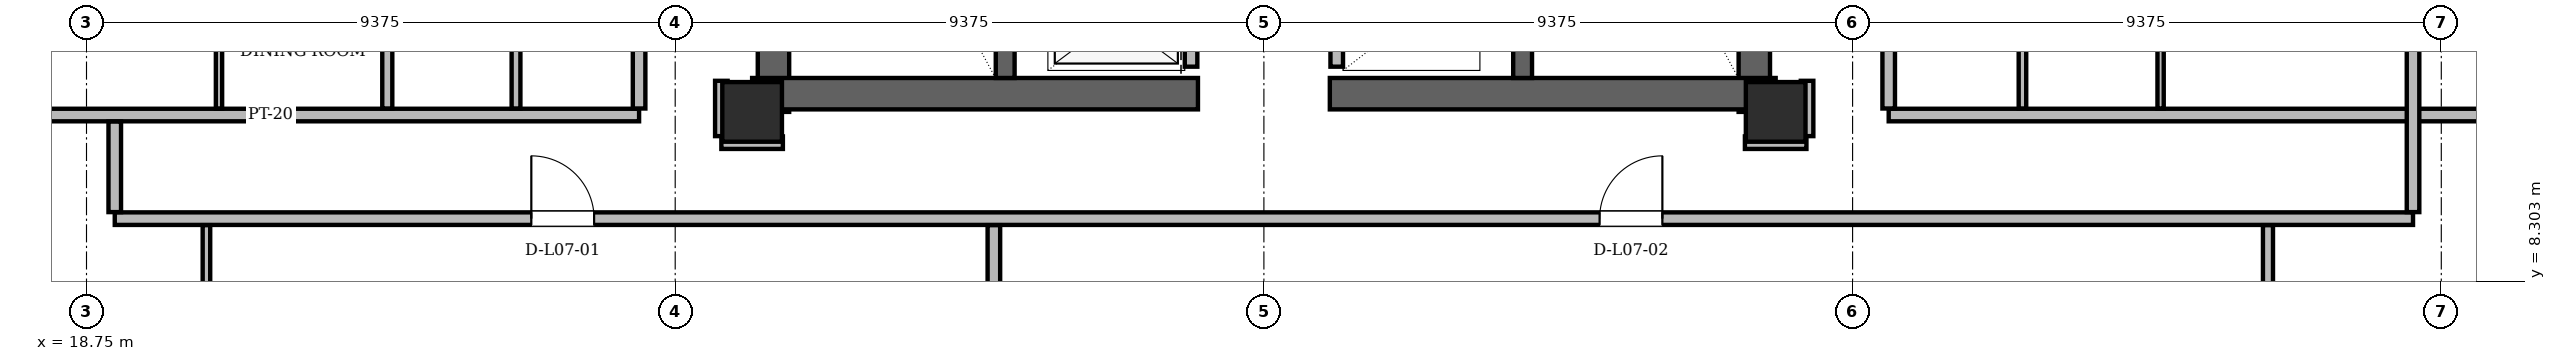
"""IFC4 building model, lengths in metres.
Left out: names, types, materials, properties, quantities, classifications, styles, units other than length and angle.
Written with IfcOpenShell. Run it as: python <this file> out.ifc"""

import sys

from ifc_helpers import new_model, si_unit, direction, frame, frame_2d, origin, origin_2d, place, context, subcontext, project, spatial, rectangle, hollow_rectangle, extrude, element, fill, save


model = new_model("IFC4")
c1 = context("Model", 3, precision=1e-05, world=origin(), true_north=direction((0.0, 1.0)))
c2 = subcontext(c1, "Body", "Model", "MODEL_VIEW")
j1 = project(units=[si_unit("LENGTHUNIT", "METRE"), si_unit("PLANEANGLEUNIT", "RADIAN")], contexts=[c1])
p1 = place(None, origin())
s1 = spatial("IfcSite", under=j1, at=p1, CompositionType="ELEMENT")
p2 = place(p1, origin())
s2 = spatial("IfcBuilding", under=s1, at=p2, CompositionType="ELEMENT")
p3 = place(p2, frame((0.0, 0.0, 30.9)))
s3 = spatial("IfcBuildingStorey", under=s2, at=p3, CompositionType="ELEMENT", Elevation=30.9)
for number, where, z_axis, x_axis in (
    (1, (29.35, 11.0, 0.0), (0.0, 0.0, 1.0), (1.0, 0.0, 0.0)),
    (2, (45.65, 11.0, 0.0), (0.0, 0.0, 1.0), (1.0, 0.0, 0.0)),
):
    element("IfcColumn", number, at=place(p3, frame(where, z_axis=z_axis, x_axis=x_axis)), inside=s3, PredefinedType="COLUMN", context=c2, shape_type="SweptSolid", body=[
        extrude(hollow_rectangle(XDim=0.95, YDim=0.95, WallThickness=0.08, at=origin_2d()), origin(), (0.0, 0.0, 1.0), 3.6),
    ])
for number, where, z_axis, x_axis in (
    (3, (29.69, 11.0, 0.0), (0.0, 0.0, 1.0), (0.0, 1.0, 0.0)),
    (4, (45.31, 11.0, 0.0), (0.0, 0.0, 1.0), (0.0, 1.0, 0.0)),
):
    element("IfcWall", number, at=place(p3, frame(where, z_axis=z_axis, x_axis=x_axis)), inside=s3, PredefinedType="SHEAR", context=c2, shape_type="SweptSolid", body=[
        extrude(rectangle(XDim=13.3, YDim=0.5, at=frame_2d((6.65, 0.0))), origin(), (0.0, 0.0, 1.0), 3.36),
    ])
for number, where, z_axis, x_axis in (
    (5, (29.35, 11.29, 0.0), (0.0, 0.0, 1.0), (1.0, 0.0, 0.0)),
    (6, (38.55, 11.29, 0.0), (0.0, 0.0, 1.0), (1.0, 0.0, 0.0)),
):
    element("IfcWall", number, at=place(p3, frame(where, z_axis=z_axis, x_axis=x_axis)), inside=s3, PredefinedType="SHEAR", context=c2, shape_type="SweptSolid", body=[
        extrude(rectangle(XDim=7.1, YDim=0.5, at=frame_2d((3.55, 0.0))), origin(), (0.0, 0.0, 1.0), 3.36),
    ])
for number, where, z_axis, x_axis in (
    (7, (33.38, 11.54, 0.0), (0.0, 0.0, 1.0), (0.0, 1.0, 0.0)),
    (8, (41.62, 11.54, 0.0), (0.0, 0.0, 1.0), (0.0, 1.0, 0.0)),
):
    element("IfcWall", number, at=place(p3, frame(where, z_axis=z_axis, x_axis=x_axis)), inside=s3, PredefinedType="SHEAR", context=c2, shape_type="SweptSolid", body=[
        extrude(rectangle(XDim=7.62, YDim=0.3, at=frame_2d((3.81, 0.0))), origin(), (0.0, 0.0, 1.0), 3.36),
    ])
p4 = place(p3, frame((13.156, 15.204, 0.0), z_axis=(0.0, 0.0, 1.0), x_axis=(0.500005775488, -0.866022069279, 0.0)))
e9 = element("IfcWall", 9, at=p4, inside=s3, PredefinedType="SOLIDWALL", context=c2, shape_type="SweptSolid", body=[
    extrude(rectangle(XDim=15.863, YDim=0.34, at=frame_2d((7.932, 0.0))), origin(), (0.0, 0.0, 1.0), 2.494),
])
p5 = place(p4, frame((2.909, 0.0, 0.85)))
e10 = element("IfcOpeningElement", 10, at=p5, cuts=e9, PredefinedType="OPENING", context=c2, shape_type="SweptSolid", body=[
    extrude(rectangle(XDim=1.2, YDim=1.48, at=frame_2d((0.6, 0.74))), frame((0.0, 0.17, 0.0), z_axis=(0.0, -1.0, 0.0), x_axis=(1.0, 0.0, 0.0)), (0.0, 0.0, 1.0), 0.34),
])
p6 = place(p3, frame((53.912, 1.466, 0.0), z_axis=(0.0, 0.0, 1.0), x_axis=(0.500005775488, 0.866022069279, 0.0)))
e11 = element("IfcWall", 11, at=p6, inside=s3, PredefinedType="SOLIDWALL", context=c2, shape_type="SweptSolid", body=[
    extrude(rectangle(XDim=15.863, YDim=0.34, at=frame_2d((7.932, 0.0))), origin(), (0.0, 0.0, 1.0), 2.494),
])
p7 = place(p6, frame((11.276, 0.0, 0.85)))
e12 = element("IfcOpeningElement", 12, at=p7, cuts=e11, PredefinedType="OPENING", context=c2, shape_type="SweptSolid", body=[
    extrude(rectangle(XDim=1.2, YDim=1.48, at=frame_2d((0.6, 0.74))), frame((0.0, 0.17, 0.0), z_axis=(0.0, -1.0, 0.0), x_axis=(1.0, 0.0, 0.0)), (0.0, 0.0, 1.0), 0.34),
])
p8 = place(p3, frame((36.34, 11.72, 0.0), z_axis=(0.0, 0.0, 1.0), x_axis=(0.0, 1.0, 0.0)))
e13 = element("IfcWall", 13, at=p8, inside=s3, PredefinedType="PARTITIONING", context=c2, shape_type="SweptSolid", body=[
    extrude(rectangle(XDim=7.6, YDim=0.2, at=frame_2d((3.8, 0.0))), origin(), (0.0, 0.0, 1.0), 3.36),
])
p9 = place(p8, frame((0.255, 0.0, 0.0)))
e14 = element("IfcOpeningElement", 14, at=p9, cuts=e13, PredefinedType="OPENING", context=c2, shape_type="SweptSolid", body=[
    extrude(rectangle(XDim=1.05, YDim=2.15, at=frame_2d((0.525, 1.075))), frame((0.0, 0.1, 0.0), z_axis=(0.0, -1.0, 0.0), x_axis=(1.0, 0.0, 0.0)), (0.0, 0.0, 1.0), 0.2),
])
p10 = place(p8, frame((2.105, 0.0, 0.0)))
e15 = element("IfcOpeningElement", 15, at=p10, cuts=e13, PredefinedType="OPENING", context=c2, shape_type="SweptSolid", body=[
    extrude(rectangle(XDim=1.05, YDim=2.15, at=frame_2d((0.525, 1.075))), frame((0.0, 0.1, 0.0), z_axis=(0.0, -1.0, 0.0), x_axis=(1.0, 0.0, 0.0)), (0.0, 0.0, 1.0), 0.2),
])
p11 = place(p8, frame((3.955, 0.0, 0.0)))
e16 = element("IfcOpeningElement", 16, at=p11, cuts=e13, PredefinedType="OPENING", context=c2, shape_type="SweptSolid", body=[
    extrude(rectangle(XDim=1.05, YDim=2.15, at=frame_2d((0.525, 1.075))), frame((0.0, 0.1, 0.0), z_axis=(0.0, -1.0, 0.0), x_axis=(1.0, 0.0, 0.0)), (0.0, 0.0, 1.0), 0.2),
])
p12 = place(p3, frame((38.66, 11.72, 0.0), z_axis=(0.0, 0.0, 1.0), x_axis=(0.0, 1.0, 0.0)))
e17 = element("IfcWall", 17, at=p12, inside=s3, PredefinedType="PARTITIONING", context=c2, shape_type="SweptSolid", body=[
    extrude(rectangle(XDim=9.1, YDim=0.2, at=frame_2d((4.55, 0.0))), origin(), (0.0, 0.0, 1.0), 3.36),
])
p13 = place(p3, frame((19.2, 9.3, 0.0), z_axis=(0.0, 0.0, 1.0), x_axis=(1.0, 0.0, 0.0)))
e18 = element("IfcWall", 18, at=p13, inside=s3, PredefinedType="PARTITIONING", context=c2, shape_type="SweptSolid", body=[
    extrude(rectangle(XDim=36.6, YDim=0.2, at=frame_2d((18.3, 0.0))), origin(), (0.0, 0.0, 1.0), 2.738),
])
p14 = place(p13, frame((6.634, 0.0, 0.0)))
e19 = element("IfcOpeningElement", 19, at=p14, cuts=e18, PredefinedType="OPENING", context=c2, shape_type="SweptSolid", body=[
    extrude(rectangle(XDim=1.0, YDim=2.18, at=frame_2d((0.5, 1.09))), frame((0.0, 0.1, 0.0), z_axis=(0.0, -1.0, 0.0), x_axis=(1.0, 0.0, 0.0)), (0.0, 0.0, 1.0), 0.2),
])
p15 = place(p13, frame((23.646, 0.0, 0.0)))
e20 = element("IfcOpeningElement", 20, at=p15, cuts=e18, PredefinedType="OPENING", context=c2, shape_type="SweptSolid", body=[
    extrude(rectangle(XDim=1.0, YDim=2.18, at=frame_2d((0.5, 1.09))), frame((0.0, 0.1, 0.0), z_axis=(0.0, -1.0, 0.0), x_axis=(1.0, 0.0, 0.0)), (0.0, 0.0, 1.0), 0.2),
])
for number, where, z_axis, x_axis in (
    (21, (28.86, 10.51, 0.0), (0.0, 0.0, 1.0), (1.0, 0.0, 0.0)),
    (22, (45.16, 10.51, 0.0), (0.0, 0.0, 1.0), (1.0, 0.0, 0.0)),
):
    element("IfcWall", number, at=place(p3, frame(where, z_axis=z_axis, x_axis=x_axis)), inside=s3, PredefinedType="PARTITIONING", context=c2, shape_type="SweptSolid", body=[
        extrude(rectangle(XDim=0.98, YDim=0.2, at=frame_2d((0.49, 0.0))), origin(), (0.0, 0.0, 1.0), 2.738),
    ])
for number, where, z_axis, x_axis in (
    (23, (15.813, 10.95, 0.0), (0.0, 0.0, 1.0), (1.0, 0.0, 0.0)),
    (24, (47.45, 10.95, 0.0), (0.0, 0.0, 1.0), (1.0, 0.0, 0.0)),
):
    element("IfcWall", number, at=place(p3, frame(where, z_axis=z_axis, x_axis=x_axis)), inside=s3, PredefinedType="PARTITIONING", context=c2, shape_type="SweptSolid", body=[
        extrude(rectangle(XDim=11.737, YDim=0.2, at=frame_2d((5.869, 0.0))), origin(), (0.0, 0.0, 1.0), 3.36),
    ])
p16 = place(p3, frame((19.2, 9.404, 0.0), z_axis=(0.0, 0.0, 1.0), x_axis=(0.0, 1.0, 0.0)))
e25 = element("IfcWall", 25, at=p16, inside=s3, PredefinedType="PARTITIONING", context=c2, shape_type="SweptSolid", body=[
    extrude(rectangle(XDim=1.442, YDim=0.2, at=frame_2d((0.721, 0.0))), origin(), (0.0, 0.0, 1.0), 3.36),
])
p17 = place(p3, frame((20.66, 2.554, 0.0), z_axis=(0.0, 0.0, 1.0), x_axis=(0.0, 1.0, 0.0)))
e26 = element("IfcWall", 26, at=p17, inside=s3, PredefinedType="PARTITIONING", context=c2, shape_type="SweptSolid", body=[
    extrude(rectangle(XDim=6.642, YDim=0.12, at=frame_2d((3.321, 0.0))), origin(), (0.0, 0.0, 1.0), 3.36),
])
p18 = place(p17, frame((2.905, 0.0, 0.0)))
e27 = element("IfcOpeningElement", 27, at=p18, cuts=e26, PredefinedType="OPENING", context=c2, shape_type="SweptSolid", body=[
    extrude(rectangle(XDim=0.88, YDim=2.08, at=frame_2d((0.44, 1.04))), frame((0.0, 0.06, 0.0), z_axis=(0.0, -1.0, 0.0), x_axis=(1.0, 0.0, 0.0)), (0.0, 0.0, 1.0), 0.12),
])
p19 = place(p3, frame((20.86, 11.054, 0.0), z_axis=(0.0, 0.0, 1.0), x_axis=(0.0, 1.0, 0.0)))
e28 = element("IfcWall", 28, at=p19, inside=s3, PredefinedType="PARTITIONING", context=c2, shape_type="SweptSolid", body=[
    extrude(rectangle(XDim=3.572, YDim=0.1, at=frame_2d((1.786, 0.0))), origin(), (0.0, 0.0, 1.0), 2.738),
])
p20 = place(p3, frame((23.54, 11.054, 0.0), z_axis=(0.0, 0.0, 1.0), x_axis=(0.0, 1.0, 0.0)))
e29 = element("IfcWall", 29, at=p20, inside=s3, PredefinedType="PARTITIONING", context=c2, shape_type="SweptSolid", body=[
    extrude(rectangle(XDim=3.572, YDim=0.16, at=frame_2d((1.786, 0.0))), origin(), (0.0, 0.0, 1.0), 2.738),
])
p21 = place(p3, frame((25.59, 11.054, 0.0), z_axis=(0.0, 0.0, 1.0), x_axis=(0.0, 1.0, 0.0)))
e30 = element("IfcWall", 30, at=p21, inside=s3, PredefinedType="PARTITIONING", context=c2, shape_type="SweptSolid", body=[
    extrude(rectangle(XDim=3.572, YDim=0.14, at=frame_2d((1.786, 0.0))), origin(), (0.0, 0.0, 1.0), 2.738),
])
p22 = place(p3, frame((27.55, 11.054, 0.0), z_axis=(0.0, 0.0, 1.0), x_axis=(0.0, 1.0, 0.0)))
e31 = element("IfcWall", 31, at=p22, inside=s3, PredefinedType="PARTITIONING", context=c2, shape_type="SweptSolid", body=[
    extrude(rectangle(XDim=14.812, YDim=0.2, at=frame_2d((7.406, 0.0))), origin(), (0.0, 0.0, 1.0), 2.738),
])
p23 = place(p22, frame((7.932, 0.0, 0.0)))
e32 = element("IfcOpeningElement", 32, at=p23, cuts=e31, PredefinedType="OPENING", context=c2, shape_type="SweptSolid", body=[
    extrude(rectangle(XDim=1.0, YDim=2.18, at=frame_2d((0.5, 1.09))), frame((0.0, 0.1, 0.0), z_axis=(0.0, -1.0, 0.0), x_axis=(1.0, 0.0, 0.0)), (0.0, 0.0, 1.0), 0.2),
])
p24 = place(p3, frame((28.86, 10.614, 0.0), z_axis=(0.0, 0.0, 1.0), x_axis=(0.0, 1.0, 0.0)))
e33 = element("IfcWall", 33, at=p24, inside=s3, PredefinedType="PARTITIONING", context=c2, shape_type="SweptSolid", body=[
    extrude(rectangle(XDim=0.881, YDim=0.2, at=frame_2d((0.44, 0.0))), origin(), (0.0, 0.0, 1.0), 2.738),
])
p25 = place(p3, frame((33.2, 1.64, 0.0), z_axis=(0.0, 0.0, 1.0), x_axis=(0.0, 1.0, 0.0)))
e34 = element("IfcWall", 34, at=p25, inside=s3, PredefinedType="PARTITIONING", context=c2, shape_type="SweptSolid", body=[
    extrude(rectangle(XDim=7.556, YDim=0.2, at=frame_2d((3.778, 0.0))), origin(), (0.0, 0.0, 1.0), 2.946),
])
p26 = place(p3, frame((46.15, 10.614, 0.0), z_axis=(0.0, 0.0, 1.0), x_axis=(0.0, 1.0, 0.0)))
e35 = element("IfcWall", 35, at=p26, inside=s3, PredefinedType="PARTITIONING", context=c2, shape_type="SweptSolid", body=[
    extrude(rectangle(XDim=0.881, YDim=0.2, at=frame_2d((0.44, 0.0))), origin(), (0.0, 0.0, 1.0), 2.738),
])
p27 = place(p3, frame((47.45, 11.054, 0.0), z_axis=(0.0, 0.0, 1.0), x_axis=(0.0, 1.0, 0.0)))
e36 = element("IfcWall", 36, at=p27, inside=s3, PredefinedType="PARTITIONING", context=c2, shape_type="SweptSolid", body=[
    extrude(rectangle(XDim=14.812, YDim=0.2, at=frame_2d((7.406, 0.0))), origin(), (0.0, 0.0, 1.0), 2.738),
])
p28 = place(p27, frame((7.932, 0.0, 0.0)))
e37 = element("IfcOpeningElement", 37, at=p28, cuts=e36, PredefinedType="OPENING", context=c2, shape_type="SweptSolid", body=[
    extrude(rectangle(XDim=1.0, YDim=2.18, at=frame_2d((0.5, 1.09))), frame((0.0, 0.1, 0.0), z_axis=(0.0, -1.0, 0.0), x_axis=(1.0, 0.0, 0.0)), (0.0, 0.0, 1.0), 0.2),
])
p29 = place(p3, frame((49.58, 11.054, 0.0), z_axis=(0.0, 0.0, 1.0), x_axis=(0.0, 1.0, 0.0)))
e38 = element("IfcWall", 38, at=p29, inside=s3, PredefinedType="PARTITIONING", context=c2, shape_type="SweptSolid", body=[
    extrude(rectangle(XDim=3.582, YDim=0.12, at=frame_2d((1.791, 0.0))), origin(), (0.0, 0.0, 1.0), 2.738),
])
p30 = place(p3, frame((51.78, 11.054, 0.0), z_axis=(0.0, 0.0, 1.0), x_axis=(0.0, 1.0, 0.0)))
e39 = element("IfcWall", 39, at=p30, inside=s3, PredefinedType="PARTITIONING", context=c2, shape_type="SweptSolid", body=[
    extrude(rectangle(XDim=3.582, YDim=0.1, at=frame_2d((1.791, 0.0))), origin(), (0.0, 0.0, 1.0), 2.738),
])
p31 = place(p3, frame((53.49, 1.64, 0.0), z_axis=(0.0, 0.0, 1.0), x_axis=(0.0, 1.0, 0.0)))
e40 = element("IfcWall", 40, at=p31, inside=s3, PredefinedType="PARTITIONING", context=c2, shape_type="SweptSolid", body=[
    extrude(rectangle(XDim=7.556, YDim=0.16, at=frame_2d((3.778, 0.0))), origin(), (0.0, 0.0, 1.0), 2.738),
])
p32 = place(p31, frame((3.378, 0.0, 0.0)))
e41 = element("IfcOpeningElement", 41, at=p32, cuts=e40, PredefinedType="OPENING", context=c2, shape_type="SweptSolid", body=[
    extrude(rectangle(XDim=0.88, YDim=2.08, at=frame_2d((0.44, 1.04))), frame((0.0, 0.08, 0.0), z_axis=(0.0, -1.0, 0.0), x_axis=(1.0, 0.0, 0.0)), (0.0, 0.0, 1.0), 0.16),
])
p33 = place(p3, frame((55.8, 9.404, 0.0), z_axis=(0.0, 0.0, 1.0), x_axis=(0.0, 1.0, 0.0)))
e42 = element("IfcWall", 42, at=p33, inside=s3, PredefinedType="PARTITIONING", context=c2, shape_type="SweptSolid", body=[
    extrude(rectangle(XDim=5.232, YDim=0.2, at=frame_2d((2.616, 0.0))), origin(), (0.0, 0.0, 1.0), 2.738),
])
p34 = place(p14, origin())
e43 = element("IfcDoor", 43, at=p34, inside=s3, OperationType="SINGLE_SWING_LEFT", PredefinedType="DOOR", context=c2, shape_type="SweptSolid", body=[
    extrude(rectangle(XDim=1.0, YDim=2.18, at=frame_2d((0.5, 1.09))), frame((0.0, 0.025, 0.0), z_axis=(0.0, -1.0, 0.0), x_axis=(1.0, 0.0, 0.0)), (0.0, 0.0, 1.0), 0.05),
])
fill(e19, e43)
p35 = place(p15, origin())
e44 = element("IfcDoor", 44, at=p35, inside=s3, OperationType="SINGLE_SWING_RIGHT", PredefinedType="DOOR", context=c2, shape_type="SweptSolid", body=[
    extrude(rectangle(XDim=1.0, YDim=2.18, at=frame_2d((0.5, 1.09))), frame((0.0, 0.025, 0.0), z_axis=(0.0, -1.0, 0.0), x_axis=(1.0, 0.0, 0.0)), (0.0, 0.0, 1.0), 0.05),
])
fill(e20, e44)
save(model, sys.argv[1])
